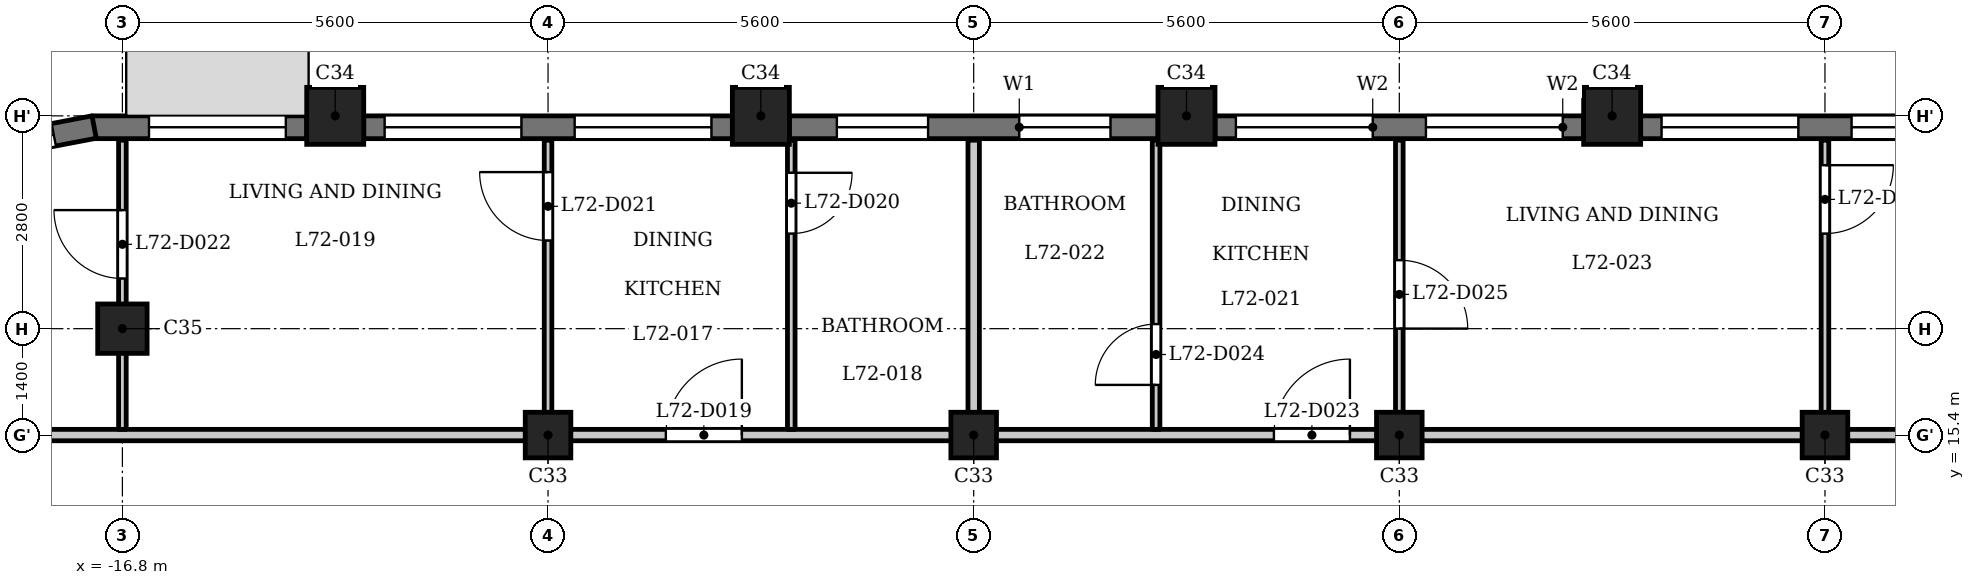
"""IFC4 building model, lengths in metres.
Left out: names, types, materials, properties, quantities, classifications, styles, units other than length and angle.
Written with IfcOpenShell. Run it as: python <this file> out.ifc"""

import sys

from ifc_helpers import new_model, si_unit, direction, frame, frame_2d, origin, origin_2d, place, context, subcontext, project, spatial, rectangle, extrude, element, fill, save


model = new_model("IFC4")
c1 = context("Model", 3, precision=1e-05, world=origin(), true_north=direction((0.0, 1.0)))
c2 = subcontext(c1, "Body", "Model", "MODEL_VIEW")
j1 = project(units=[si_unit("LENGTHUNIT", "METRE"), si_unit("PLANEANGLEUNIT", "RADIAN")], contexts=[c1])
p1 = place(None, origin())
s1 = spatial("IfcSite", under=j1, at=p1, CompositionType="ELEMENT")
p2 = place(p1, origin())
s2 = spatial("IfcBuilding", under=s1, at=p2, CompositionType="ELEMENT")
p3 = place(p2, frame((0.0, 0.0, 276.7)))
s3 = spatial("IfcBuildingStorey", under=s2, at=p3, CompositionType="ELEMENT", Elevation=276.7)
for number, where, z_axis, x_axis in (
    (1, (2.8, 19.6, 0.0), (0.0, 0.0, 1.0), (1.0, 0.0, 0.0)),
    (2, (-2.8, 19.6, 0.0), (0.0, 0.0, 1.0), (1.0, 0.0, 0.0)),
    (3, (-8.4, 19.6, 0.0), (0.0, 0.0, 1.0), (1.0, 0.0, 0.0)),
    (4, (-14.0, 19.6, 0.0), (0.0, 0.0, 1.0), (1.0, 0.0, 0.0)),
):
    element("IfcColumn", number, at=place(p3, frame(where, z_axis=z_axis, x_axis=x_axis)), inside=s3, PredefinedType="COLUMN", context=c2, shape_type="SweptSolid", body=[
        extrude(rectangle(XDim=0.75, YDim=0.75, at=origin_2d()), origin(), (0.0, 0.0, 1.0), 3.5),
    ])
p4 = place(p3, frame((-16.8, 16.8, 0.0), z_axis=(0.0, 0.0, 1.0), x_axis=(1.0, 0.0, 0.0)))
e5 = element("IfcColumn", 5, at=p4, inside=s3, PredefinedType="COLUMN", context=c2, shape_type="SweptSolid", body=[
    extrude(rectangle(XDim=0.65, YDim=0.65, at=origin_2d()), origin(), (0.0, 0.0, 1.0), 3.5),
])
for number, where, z_axis, x_axis in (
    (6, (-11.2, 15.4, 0.0), (0.0, 0.0, 1.0), (1.0, 0.0, 0.0)),
    (7, (-5.6, 15.4, 0.0), (0.0, 0.0, 1.0), (1.0, 0.0, 0.0)),
    (8, (0.0, 15.4, 0.0), (0.0, 0.0, 1.0), (1.0, 0.0, 0.0)),
    (9, (5.6, 15.4, 0.0), (0.0, 0.0, 1.0), (1.0, 0.0, 0.0)),
):
    element("IfcColumn", number, at=place(p3, frame(where, z_axis=z_axis, x_axis=x_axis)), inside=s3, PredefinedType="COLUMN", context=c2, shape_type="SweptSolid", body=[
        extrude(rectangle(XDim=0.6, YDim=0.6, at=origin_2d()), origin(), (0.0, 0.0, 1.0), 3.5),
    ])
p5 = place(p3, frame((8.025, 19.45, 0.0), z_axis=(0.0, 0.0, 1.0), x_axis=(-1.0, 0.0, 0.0)))
e10 = element("IfcWall", 10, at=p5, inside=s3, PredefinedType="SOLIDWALL", context=c2, shape_type="SweptSolid", body=[
    extrude(rectangle(XDim=4.85, YDim=0.3, at=frame_2d((2.425, 0.0))), origin(), (0.0, 0.0, 1.0), 2.55),
])
p6 = place(p5, frame((0.275, 0.0, 0.9)))
e11 = element("IfcOpeningElement", 11, at=p6, cuts=e10, PredefinedType="OPENING", context=c2, shape_type="SweptSolid", body=[
    extrude(rectangle(XDim=1.8, YDim=1.25, at=frame_2d((0.9, 0.625))), frame((0.0, 0.16, 0.0), z_axis=(0.0, -1.0, 0.0), x_axis=(1.0, 0.0, 0.0)), (0.0, 0.0, 1.0), 0.32),
])
p7 = place(p5, frame((2.775, 0.0, 0.9)))
e12 = element("IfcOpeningElement", 12, at=p7, cuts=e10, PredefinedType="OPENING", context=c2, shape_type="SweptSolid", body=[
    extrude(rectangle(XDim=1.8, YDim=1.25, at=frame_2d((0.9, 0.625))), frame((0.0, 0.16, 0.0), z_axis=(0.0, -1.0, 0.0), x_axis=(1.0, 0.0, 0.0)), (0.0, 0.0, 1.0), 0.32),
])
p8 = place(p3, frame((2.425, 19.45, 0.0), z_axis=(0.0, 0.0, 1.0), x_axis=(-1.0, 0.0, 0.0)))
e13 = element("IfcWall", 13, at=p8, inside=s3, PredefinedType="SOLIDWALL", context=c2, shape_type="SweptSolid", body=[
    extrude(rectangle(XDim=4.85, YDim=0.3, at=frame_2d((2.425, 0.0))), origin(), (0.0, 0.0, 1.0), 2.55),
])
p9 = place(p8, frame((0.275, 0.0, 0.9)))
e14 = element("IfcOpeningElement", 14, at=p9, cuts=e13, PredefinedType="OPENING", context=c2, shape_type="SweptSolid", body=[
    extrude(rectangle(XDim=1.8, YDim=1.25, at=frame_2d((0.9, 0.625))), frame((0.0, 0.16, 0.0), z_axis=(0.0, -1.0, 0.0), x_axis=(1.0, 0.0, 0.0)), (0.0, 0.0, 1.0), 0.32),
])
p10 = place(p8, frame((2.775, 0.0, 0.9)))
e15 = element("IfcOpeningElement", 15, at=p10, cuts=e13, PredefinedType="OPENING", context=c2, shape_type="SweptSolid", body=[
    extrude(rectangle(XDim=1.8, YDim=1.25, at=frame_2d((0.9, 0.625))), frame((0.0, 0.16, 0.0), z_axis=(0.0, -1.0, 0.0), x_axis=(1.0, 0.0, 0.0)), (0.0, 0.0, 1.0), 0.32),
])
p11 = place(p3, frame((-3.175, 19.45, 0.0), z_axis=(0.0, 0.0, 1.0), x_axis=(-1.0, 0.0, 0.0)))
e16 = element("IfcWall", 16, at=p11, inside=s3, PredefinedType="SOLIDWALL", context=c2, shape_type="SweptSolid", body=[
    extrude(rectangle(XDim=4.85, YDim=0.3, at=frame_2d((2.425, 0.0))), origin(), (0.0, 0.0, 1.0), 2.55),
])
p12 = place(p11, frame((0.625, 0.0, 0.6)))
e17 = element("IfcOpeningElement", 17, at=p12, cuts=e16, PredefinedType="OPENING", context=c2, shape_type="SweptSolid", body=[
    extrude(rectangle(XDim=1.2, YDim=1.55, at=frame_2d((0.6, 0.775))), frame((0.0, 0.16, 0.0), z_axis=(0.0, -1.0, 0.0), x_axis=(1.0, 0.0, 0.0)), (0.0, 0.0, 1.0), 0.32),
])
p13 = place(p11, frame((3.025, 0.0, 0.6)))
e18 = element("IfcOpeningElement", 18, at=p13, cuts=e16, PredefinedType="OPENING", context=c2, shape_type="SweptSolid", body=[
    extrude(rectangle(XDim=1.2, YDim=1.55, at=frame_2d((0.6, 0.775))), frame((0.0, 0.16, 0.0), z_axis=(0.0, -1.0, 0.0), x_axis=(1.0, 0.0, 0.0)), (0.0, 0.0, 1.0), 0.32),
])
p14 = place(p3, frame((-8.775, 19.45, 0.0), z_axis=(0.0, 0.0, 1.0), x_axis=(-1.0, 0.0, 0.0)))
e19 = element("IfcWall", 19, at=p14, inside=s3, PredefinedType="SOLIDWALL", context=c2, shape_type="SweptSolid", body=[
    extrude(rectangle(XDim=4.85, YDim=0.3, at=frame_2d((2.425, 0.0))), origin(), (0.0, 0.0, 1.0), 2.55),
])
p15 = place(p14, frame((0.275, 0.0, 0.9)))
e20 = element("IfcOpeningElement", 20, at=p15, cuts=e19, PredefinedType="OPENING", context=c2, shape_type="SweptSolid", body=[
    extrude(rectangle(XDim=1.8, YDim=1.25, at=frame_2d((0.9, 0.625))), frame((0.0, 0.16, 0.0), z_axis=(0.0, -1.0, 0.0), x_axis=(1.0, 0.0, 0.0)), (0.0, 0.0, 1.0), 0.32),
])
p16 = place(p14, frame((2.775, 0.0, 0.9)))
e21 = element("IfcOpeningElement", 21, at=p16, cuts=e19, PredefinedType="OPENING", context=c2, shape_type="SweptSolid", body=[
    extrude(rectangle(XDim=1.8, YDim=1.25, at=frame_2d((0.9, 0.625))), frame((0.0, 0.16, 0.0), z_axis=(0.0, -1.0, 0.0), x_axis=(1.0, 0.0, 0.0)), (0.0, 0.0, 1.0), 0.32),
])
p17 = place(p3, frame((-14.375, 19.45, 0.0), z_axis=(0.0, 0.0, 1.0), x_axis=(-1.0, 0.0, 0.0)))
e22 = element("IfcWall", 22, at=p17, inside=s3, PredefinedType="SOLIDWALL", context=c2, shape_type="SweptSolid", body=[
    extrude(rectangle(XDim=2.825, YDim=0.3, at=frame_2d((1.413, 0.0))), origin(), (0.0, 0.0, 1.0), 2.55),
])
p18 = place(p17, frame((0.275, 0.0, 0.9)))
e23 = element("IfcOpeningElement", 23, at=p18, cuts=e22, PredefinedType="OPENING", context=c2, shape_type="SweptSolid", body=[
    extrude(rectangle(XDim=1.8, YDim=1.25, at=frame_2d((0.9, 0.625))), frame((0.0, 0.16, 0.0), z_axis=(0.0, -1.0, 0.0), x_axis=(1.0, 0.0, 0.0)), (0.0, 0.0, 1.0), 0.32),
])
p19 = place(p3, frame((-17.172, 19.453, 0.0), z_axis=(0.0, 0.0, 1.0), x_axis=(-0.982284001233, -0.187398348234, 0.0)))
e24 = element("IfcWall", 24, at=p19, inside=s3, PredefinedType="SOLIDWALL", context=c2, shape_type="SweptSolid", body=[
    extrude(rectangle(XDim=1.881, YDim=0.3, at=frame_2d((0.941, 0.0))), origin(), (0.0, 0.0, 1.0), 2.55),
])
p20 = place(p19, frame((0.541, 0.0, 0.6)))
e25 = element("IfcOpeningElement", 25, at=p20, cuts=e24, PredefinedType="OPENING", context=c2, shape_type="SweptSolid", body=[
    extrude(rectangle(XDim=0.8, YDim=1.55, at=frame_2d((0.4, 0.775))), frame((0.0, 0.16, 0.0), z_axis=(0.0, -1.0, 0.0), x_axis=(1.0, 0.0, 0.0)), (0.0, 0.0, 1.0), 0.32),
])
p21 = place(p3, frame((-23.55, 15.4, 0.0), z_axis=(0.0, 0.0, 1.0), x_axis=(1.0, 0.0, 0.0)))
e26 = element("IfcWall", 26, at=p21, inside=s3, PredefinedType="PARTITIONING", context=c2, shape_type="SweptSolid", body=[
    extrude(rectangle(XDim=46.872, YDim=0.15, at=frame_2d((23.436, 0.0))), origin(), (0.0, 0.0, 1.0), 3.2),
])
p22 = place(p21, frame((13.9, 0.0, 0.0)))
e27 = element("IfcOpeningElement", 27, at=p22, cuts=e26, PredefinedType="OPENING", context=c2, shape_type="SweptSolid", body=[
    extrude(rectangle(XDim=1.0, YDim=2.1, at=frame_2d((0.5, 1.05))), frame((0.0, 0.085, 0.0), z_axis=(0.0, -1.0, 0.0), x_axis=(1.0, 0.0, 0.0)), (0.0, 0.0, 1.0), 0.17),
])
p23 = place(p21, frame((21.9, 0.0, 0.0)))
e28 = element("IfcOpeningElement", 28, at=p23, cuts=e26, PredefinedType="OPENING", context=c2, shape_type="SweptSolid", body=[
    extrude(rectangle(XDim=1.0, YDim=2.1, at=frame_2d((0.5, 1.05))), frame((0.0, 0.085, 0.0), z_axis=(0.0, -1.0, 0.0), x_axis=(1.0, 0.0, 0.0)), (0.0, 0.0, 1.0), 0.17),
])
p24 = place(p21, frame((38.7, 0.0, 0.0)))
e29 = element("IfcOpeningElement", 29, at=p24, cuts=e26, PredefinedType="OPENING", context=c2, shape_type="SweptSolid", body=[
    extrude(rectangle(XDim=1.0, YDim=2.1, at=frame_2d((0.5, 1.05))), frame((0.0, 0.085, 0.0), z_axis=(0.0, -1.0, 0.0), x_axis=(1.0, 0.0, 0.0)), (0.0, 0.0, 1.0), 0.17),
])
p25 = place(p3, frame((-16.8, 15.475, 0.0), z_axis=(0.0, 0.0, 1.0), x_axis=(0.0, 1.0, 0.0)))
e30 = element("IfcWall", 30, at=p25, inside=s3, PredefinedType="PARTITIONING", context=c2, shape_type="SweptSolid", body=[
    extrude(rectangle(XDim=3.805, YDim=0.1, at=frame_2d((1.902, 0.0))), origin(), (0.0, 0.0, 1.0), 3.2),
])
p26 = place(p25, frame((1.985, 0.0, 0.0)))
e31 = element("IfcOpeningElement", 31, at=p26, cuts=e30, PredefinedType="OPENING", context=c2, shape_type="SweptSolid", body=[
    extrude(rectangle(XDim=0.9, YDim=2.1, at=frame_2d((0.45, 1.05))), frame((0.0, 0.06, 0.0), z_axis=(0.0, -1.0, 0.0), x_axis=(1.0, 0.0, 0.0)), (0.0, 0.0, 1.0), 0.12),
])
p27 = place(p3, frame((-11.2, 15.475, 0.0), z_axis=(0.0, 0.0, 1.0), x_axis=(0.0, 1.0, 0.0)))
e32 = element("IfcWall", 32, at=p27, inside=s3, PredefinedType="PARTITIONING", context=c2, shape_type="SweptSolid", body=[
    extrude(rectangle(XDim=3.805, YDim=0.1, at=frame_2d((1.902, 0.0))), origin(), (0.0, 0.0, 1.0), 3.2),
])
p28 = place(p27, frame((2.485, 0.0, 0.0)))
e33 = element("IfcOpeningElement", 33, at=p28, cuts=e32, PredefinedType="OPENING", context=c2, shape_type="SweptSolid", body=[
    extrude(rectangle(XDim=0.9, YDim=2.1, at=frame_2d((0.45, 1.05))), frame((0.0, 0.06, 0.0), z_axis=(0.0, -1.0, 0.0), x_axis=(1.0, 0.0, 0.0)), (0.0, 0.0, 1.0), 0.12),
])
p29 = place(p3, frame((-8.0, 15.475, 0.0), z_axis=(0.0, 0.0, 1.0), x_axis=(0.0, 1.0, 0.0)))
e34 = element("IfcWall", 34, at=p29, inside=s3, PredefinedType="PARTITIONING", context=c2, shape_type="SweptSolid", body=[
    extrude(rectangle(XDim=3.805, YDim=0.1, at=frame_2d((1.902, 0.0))), origin(), (0.0, 0.0, 1.0), 3.2),
])
p30 = place(p29, frame((2.576, 0.0, 0.0)))
e35 = element("IfcOpeningElement", 35, at=p30, cuts=e34, PredefinedType="OPENING", context=c2, shape_type="SweptSolid", body=[
    extrude(rectangle(XDim=0.8, YDim=2.1, at=frame_2d((0.4, 1.05))), frame((0.0, 0.06, 0.0), z_axis=(0.0, -1.0, 0.0), x_axis=(1.0, 0.0, 0.0)), (0.0, 0.0, 1.0), 0.12),
])
p31 = place(p3, frame((-5.6, 15.475, 0.0), z_axis=(0.0, 0.0, 1.0), x_axis=(0.0, 1.0, 0.0)))
e36 = element("IfcWall", 36, at=p31, inside=s3, PredefinedType="PARTITIONING", context=c2, shape_type="SweptSolid", body=[
    extrude(rectangle(XDim=3.805, YDim=0.15, at=frame_2d((1.902, 0.0))), origin(), (0.0, 0.0, 1.0), 3.2),
])
p32 = place(p3, frame((-3.2, 15.475, 0.0), z_axis=(0.0, 0.0, 1.0), x_axis=(0.0, 1.0, 0.0)))
e37 = element("IfcWall", 37, at=p32, inside=s3, PredefinedType="PARTITIONING", context=c2, shape_type="SweptSolid", body=[
    extrude(rectangle(XDim=3.805, YDim=0.1, at=frame_2d((1.902, 0.0))), origin(), (0.0, 0.0, 1.0), 3.2),
])
p33 = place(p32, frame((0.585, 0.0, 0.0)))
e38 = element("IfcOpeningElement", 38, at=p33, cuts=e37, PredefinedType="OPENING", context=c2, shape_type="SweptSolid", body=[
    extrude(rectangle(XDim=0.8, YDim=2.1, at=frame_2d((0.4, 1.05))), frame((0.0, 0.06, 0.0), z_axis=(0.0, -1.0, 0.0), x_axis=(1.0, 0.0, 0.0)), (0.0, 0.0, 1.0), 0.12),
])
p34 = place(p3, frame((0.0, 15.475, 0.0), z_axis=(0.0, 0.0, 1.0), x_axis=(0.0, 1.0, 0.0)))
e39 = element("IfcWall", 39, at=p34, inside=s3, PredefinedType="PARTITIONING", context=c2, shape_type="SweptSolid", body=[
    extrude(rectangle(XDim=3.805, YDim=0.1, at=frame_2d((1.902, 0.0))), origin(), (0.0, 0.0, 1.0), 3.2),
])
p35 = place(p34, frame((1.326, 0.0, 0.0)))
e40 = element("IfcOpeningElement", 40, at=p35, cuts=e39, PredefinedType="OPENING", context=c2, shape_type="SweptSolid", body=[
    extrude(rectangle(XDim=0.9, YDim=2.1, at=frame_2d((0.45, 1.05))), frame((0.0, 0.06, 0.0), z_axis=(0.0, -1.0, 0.0), x_axis=(1.0, 0.0, 0.0)), (0.0, 0.0, 1.0), 0.12),
])
p36 = place(p3, frame((5.6, 15.475, 0.0), z_axis=(0.0, 0.0, 1.0), x_axis=(0.0, 1.0, 0.0)))
e41 = element("IfcWall", 41, at=p36, inside=s3, PredefinedType="PARTITIONING", context=c2, shape_type="SweptSolid", body=[
    extrude(rectangle(XDim=3.805, YDim=0.1, at=frame_2d((1.902, 0.0))), origin(), (0.0, 0.0, 1.0), 3.2),
])
p37 = place(p36, frame((2.576, 0.0, 0.0)))
e42 = element("IfcOpeningElement", 42, at=p37, cuts=e41, PredefinedType="OPENING", context=c2, shape_type="SweptSolid", body=[
    extrude(rectangle(XDim=0.9, YDim=2.1, at=frame_2d((0.45, 1.05))), frame((0.0, 0.06, 0.0), z_axis=(0.0, -1.0, 0.0), x_axis=(1.0, 0.0, 0.0)), (0.0, 0.0, 1.0), 0.12),
])
p38 = place(p22, origin())
e43 = element("IfcDoor", 43, at=p38, inside=s3, OperationType="SINGLE_SWING_LEFT", PredefinedType="DOOR", context=c2, shape_type="SweptSolid", body=[
    extrude(rectangle(XDim=1.0, YDim=2.1, at=frame_2d((0.5, 1.05))), frame((0.0, 0.025, 0.0), z_axis=(0.0, -1.0, 0.0), x_axis=(1.0, 0.0, 0.0)), (0.0, 0.0, 1.0), 0.05),
])
fill(e27, e43)
p39 = place(p30, origin())
e44 = element("IfcDoor", 44, at=p39, inside=s3, OperationType="SINGLE_SWING_RIGHT", PredefinedType="DOOR", context=c2, shape_type="SweptSolid", body=[
    extrude(rectangle(XDim=0.8, YDim=2.1, at=frame_2d((0.4, 1.05))), frame((0.0, 0.025, 0.0), z_axis=(0.0, -1.0, 0.0), x_axis=(1.0, 0.0, 0.0)), (0.0, 0.0, 1.0), 0.05),
])
fill(e35, e44)
p40 = place(p28, origin())
e45 = element("IfcDoor", 45, at=p40, inside=s3, OperationType="SINGLE_SWING_LEFT", PredefinedType="DOOR", context=c2, shape_type="SweptSolid", body=[
    extrude(rectangle(XDim=0.9, YDim=2.1, at=frame_2d((0.45, 1.05))), frame((0.0, 0.025, 0.0), z_axis=(0.0, -1.0, 0.0), x_axis=(1.0, 0.0, 0.0)), (0.0, 0.0, 1.0), 0.05),
])
fill(e33, e45)
p41 = place(p26, origin())
e46 = element("IfcDoor", 46, at=p41, inside=s3, OperationType="SINGLE_SWING_LEFT", PredefinedType="DOOR", context=c2, shape_type="SweptSolid", body=[
    extrude(rectangle(XDim=0.9, YDim=2.1, at=frame_2d((0.45, 1.05))), frame((0.0, 0.025, 0.0), z_axis=(0.0, -1.0, 0.0), x_axis=(1.0, 0.0, 0.0)), (0.0, 0.0, 1.0), 0.05),
])
fill(e31, e46)
p42 = place(p23, origin())
e47 = element("IfcDoor", 47, at=p42, inside=s3, OperationType="SINGLE_SWING_LEFT", PredefinedType="DOOR", context=c2, shape_type="SweptSolid", body=[
    extrude(rectangle(XDim=1.0, YDim=2.1, at=frame_2d((0.5, 1.05))), frame((0.0, 0.025, 0.0), z_axis=(0.0, -1.0, 0.0), x_axis=(1.0, 0.0, 0.0)), (0.0, 0.0, 1.0), 0.05),
])
fill(e28, e47)
p43 = place(p33, origin())
e48 = element("IfcDoor", 48, at=p43, inside=s3, OperationType="SINGLE_SWING_RIGHT", PredefinedType="DOOR", context=c2, shape_type="SweptSolid", body=[
    extrude(rectangle(XDim=0.8, YDim=2.1, at=frame_2d((0.4, 1.05))), frame((0.0, 0.025, 0.0), z_axis=(0.0, -1.0, 0.0), x_axis=(1.0, 0.0, 0.0)), (0.0, 0.0, 1.0), 0.05),
])
fill(e38, e48)
p44 = place(p35, origin())
e49 = element("IfcDoor", 49, at=p44, inside=s3, OperationType="SINGLE_SWING_LEFT", PredefinedType="DOOR", context=c2, shape_type="SweptSolid", body=[
    extrude(rectangle(XDim=0.9, YDim=2.1, at=frame_2d((0.45, 1.05))), frame((0.0, 0.025, 0.0), z_axis=(0.0, -1.0, 0.0), x_axis=(1.0, 0.0, 0.0)), (0.0, 0.0, 1.0), 0.05),
])
fill(e40, e49)
p45 = place(p37, origin())
e50 = element("IfcDoor", 50, at=p45, inside=s3, OperationType="SINGLE_SWING_RIGHT", PredefinedType="DOOR", context=c2, shape_type="SweptSolid", body=[
    extrude(rectangle(XDim=0.9, YDim=2.1, at=frame_2d((0.45, 1.05))), frame((0.0, 0.025, 0.0), z_axis=(0.0, -1.0, 0.0), x_axis=(1.0, 0.0, 0.0)), (0.0, 0.0, 1.0), 0.05),
])
fill(e42, e50)
p46 = place(p6, origin())
e51 = element("IfcWindow", 51, at=p46, inside=s3, PartitioningType="SINGLE_PANEL", PredefinedType="WINDOW", context=c2, shape_type="SweptSolid", body=[
    extrude(rectangle(XDim=1.8, YDim=1.25, at=frame_2d((0.9, 0.625))), frame((0.0, 0.03, 0.0), z_axis=(0.0, -1.0, 0.0), x_axis=(1.0, 0.0, 0.0)), (0.0, 0.0, 1.0), 0.06),
])
fill(e11, e51)
p47 = place(p7, origin())
e52 = element("IfcWindow", 52, at=p47, inside=s3, PartitioningType="SINGLE_PANEL", PredefinedType="WINDOW", context=c2, shape_type="SweptSolid", body=[
    extrude(rectangle(XDim=1.8, YDim=1.25, at=frame_2d((0.9, 0.625))), frame((0.0, 0.03, 0.0), z_axis=(0.0, -1.0, 0.0), x_axis=(1.0, 0.0, 0.0)), (0.0, 0.0, 1.0), 0.06),
])
fill(e12, e52)
p48 = place(p9, origin())
e53 = element("IfcWindow", 53, at=p48, inside=s3, PartitioningType="SINGLE_PANEL", PredefinedType="WINDOW", context=c2, shape_type="SweptSolid", body=[
    extrude(rectangle(XDim=1.8, YDim=1.25, at=frame_2d((0.9, 0.625))), frame((0.0, 0.03, 0.0), z_axis=(0.0, -1.0, 0.0), x_axis=(1.0, 0.0, 0.0)), (0.0, 0.0, 1.0), 0.06),
])
fill(e14, e53)
p49 = place(p10, origin())
e54 = element("IfcWindow", 54, at=p49, inside=s3, PartitioningType="SINGLE_PANEL", PredefinedType="WINDOW", context=c2, shape_type="SweptSolid", body=[
    extrude(rectangle(XDim=1.8, YDim=1.25, at=frame_2d((0.9, 0.625))), frame((0.0, 0.03, 0.0), z_axis=(0.0, -1.0, 0.0), x_axis=(1.0, 0.0, 0.0)), (0.0, 0.0, 1.0), 0.06),
])
fill(e15, e54)
p50 = place(p12, origin())
e55 = element("IfcWindow", 55, at=p50, inside=s3, PartitioningType="SINGLE_PANEL", PredefinedType="WINDOW", context=c2, shape_type="SweptSolid", body=[
    extrude(rectangle(XDim=1.2, YDim=1.55, at=frame_2d((0.6, 0.775))), frame((0.0, 0.03, 0.0), z_axis=(0.0, -1.0, 0.0), x_axis=(1.0, 0.0, 0.0)), (0.0, 0.0, 1.0), 0.06),
])
fill(e17, e55)
p51 = place(p13, origin())
e56 = element("IfcWindow", 56, at=p51, inside=s3, PartitioningType="SINGLE_PANEL", PredefinedType="WINDOW", context=c2, shape_type="SweptSolid", body=[
    extrude(rectangle(XDim=1.2, YDim=1.55, at=frame_2d((0.6, 0.775))), frame((0.0, 0.03, 0.0), z_axis=(0.0, -1.0, 0.0), x_axis=(1.0, 0.0, 0.0)), (0.0, 0.0, 1.0), 0.06),
])
fill(e18, e56)
p52 = place(p15, origin())
e57 = element("IfcWindow", 57, at=p52, inside=s3, PartitioningType="SINGLE_PANEL", PredefinedType="WINDOW", context=c2, shape_type="SweptSolid", body=[
    extrude(rectangle(XDim=1.8, YDim=1.25, at=frame_2d((0.9, 0.625))), frame((0.0, 0.03, 0.0), z_axis=(0.0, -1.0, 0.0), x_axis=(1.0, 0.0, 0.0)), (0.0, 0.0, 1.0), 0.06),
])
fill(e20, e57)
p53 = place(p16, origin())
e58 = element("IfcWindow", 58, at=p53, inside=s3, PartitioningType="SINGLE_PANEL", PredefinedType="WINDOW", context=c2, shape_type="SweptSolid", body=[
    extrude(rectangle(XDim=1.8, YDim=1.25, at=frame_2d((0.9, 0.625))), frame((0.0, 0.03, 0.0), z_axis=(0.0, -1.0, 0.0), x_axis=(1.0, 0.0, 0.0)), (0.0, 0.0, 1.0), 0.06),
])
fill(e21, e58)
p54 = place(p18, origin())
e59 = element("IfcWindow", 59, at=p54, inside=s3, PartitioningType="SINGLE_PANEL", PredefinedType="WINDOW", context=c2, shape_type="SweptSolid", body=[
    extrude(rectangle(XDim=1.8, YDim=1.25, at=frame_2d((0.9, 0.625))), frame((0.0, 0.03, 0.0), z_axis=(0.0, -1.0, 0.0), x_axis=(1.0, 0.0, 0.0)), (0.0, 0.0, 1.0), 0.06),
])
fill(e23, e59)
p55 = place(p20, origin())
e60 = element("IfcWindow", 60, at=p55, inside=s3, PartitioningType="SINGLE_PANEL", PredefinedType="WINDOW", context=c2, shape_type="SweptSolid", body=[
    extrude(rectangle(XDim=0.8, YDim=1.55, at=frame_2d((0.4, 0.775))), frame((0.0, 0.03, 0.0), z_axis=(0.0, -1.0, 0.0), x_axis=(1.0, 0.0, 0.0)), (0.0, 0.0, 1.0), 0.06),
])
fill(e25, e60)
save(model, sys.argv[1])
